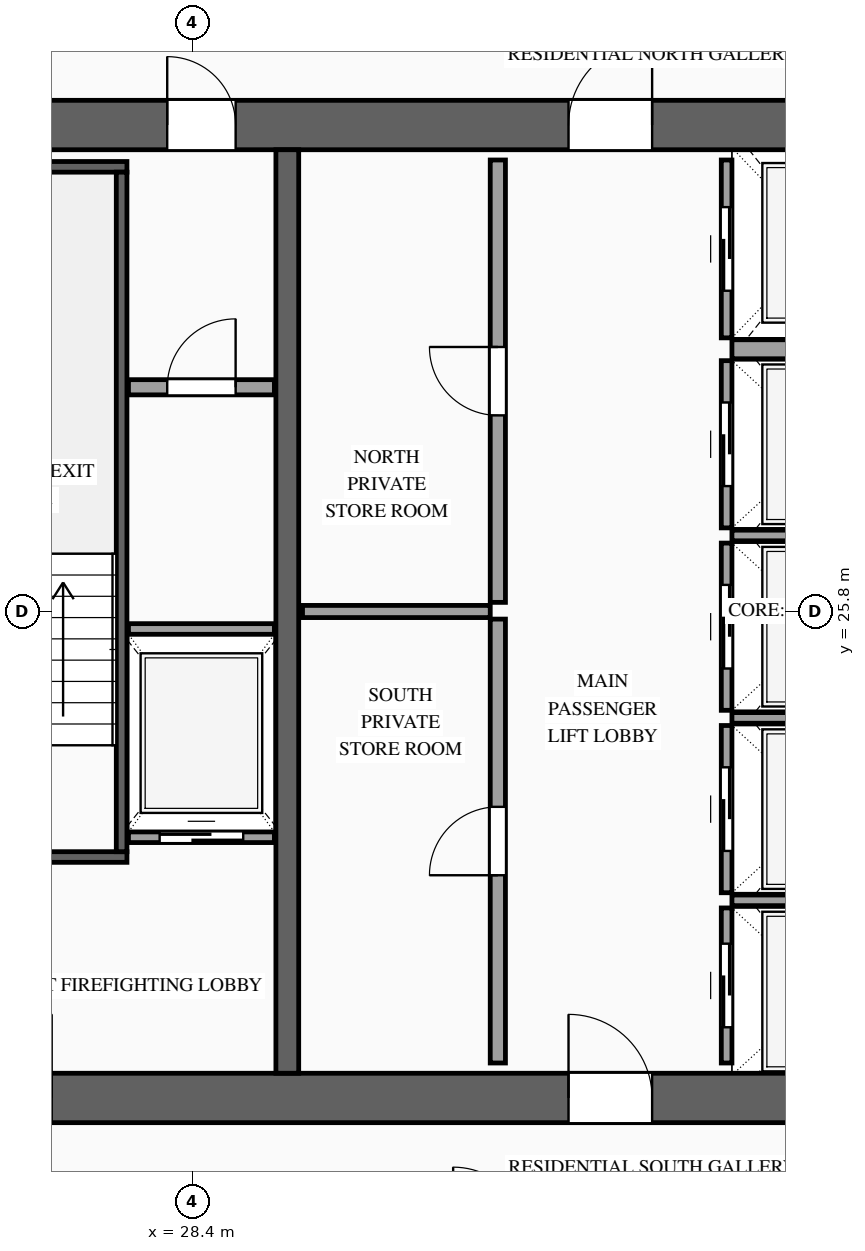
"""IFC4 building model, lengths in metres.
Left out: names, types, materials, properties, quantities, classifications, styles, units other than length and angle.
Written with IfcOpenShell. Run it as: python <this file> out.ifc"""

import sys

from ifc_helpers import new_model, si_unit, direction, frame, frame_2d, origin, place, context, subcontext, project, spatial, rectangle, extrude, source, transform, mapped, element, fill, save


model = new_model("IFC4")
c1 = context("Model", 3, precision=1e-05, world=origin(), true_north=direction((0.0, 1.0)))
c2 = subcontext(c1, "Body", "Model", "MODEL_VIEW")
j1 = project(units=[si_unit("LENGTHUNIT", "METRE"), si_unit("PLANEANGLEUNIT", "RADIAN")], contexts=[c1])
p1 = place(None, origin())
s1 = spatial("IfcSite", under=j1, at=p1, CompositionType="ELEMENT")
p2 = place(p1, origin())
s2 = spatial("IfcBuilding", under=s1, at=p2, CompositionType="ELEMENT")
p3 = place(p2, frame((0.0, 0.0, 188.0)))
s3 = spatial("IfcBuildingStorey", under=s2, at=p3, CompositionType="ELEMENT", Elevation=188.0)
p4 = place(p3, frame((23.475, 19.4, 0.0), z_axis=(0.0, 0.0, 1.0), x_axis=(1.0, 0.0, 0.0)))
e1 = element("IfcWall", 1, at=p4, inside=s3, PredefinedType="SHEAR", context=c2, shape_type="SweptSolid", body=[
    extrude(rectangle(XDim=27.05, YDim=0.65, at=frame_2d((13.525, 0.0))), origin(), (0.0, 0.0, 1.0), 3.5),
])
p5 = place(p4, frame((1.975, 0.0, 0.0)))
e2 = element("IfcOpeningElement", 2, at=p5, cuts=e1, PredefinedType="OPENING", context=c2, shape_type="SweptSolid", body=[
    extrude(rectangle(XDim=1.1, YDim=2.2, at=frame_2d((0.55, 1.1))), frame((0.0, 0.34, 0.0), z_axis=(0.0, -1.0, 0.0), x_axis=(1.0, 0.0, 0.0)), (0.0, 0.0, 1.0), 0.68),
])
p6 = place(p4, frame((9.875, 0.0, 0.0)))
e3 = element("IfcOpeningElement", 3, at=p6, cuts=e1, PredefinedType="OPENING", context=c2, shape_type="SweptSolid", body=[
    extrude(rectangle(XDim=1.1, YDim=2.2, at=frame_2d((0.55, 1.1))), frame((0.0, 0.34, 0.0), z_axis=(0.0, -1.0, 0.0), x_axis=(1.0, 0.0, 0.0)), (0.0, 0.0, 1.0), 0.68),
])
p7 = place(p4, frame((23.075, 0.0, 0.0)))
e4 = element("IfcOpeningElement", 4, at=p7, cuts=e1, PredefinedType="OPENING", context=c2, shape_type="SweptSolid", body=[
    extrude(rectangle(XDim=1.1, YDim=2.2, at=frame_2d((0.55, 1.1))), frame((0.0, 0.34, 0.0), z_axis=(0.0, -1.0, 0.0), x_axis=(1.0, 0.0, 0.0)), (0.0, 0.0, 1.0), 0.68),
])
p8 = place(p4, frame((19.695, 0.0, 0.0)))
e5 = element("IfcOpeningElement", 5, at=p8, cuts=e1, PredefinedType="OPENING", context=c2, shape_type="SweptSolid", body=[
    extrude(rectangle(XDim=0.9, YDim=2.15, at=frame_2d((0.45, 1.075))), frame((0.0, 0.34, 0.0), z_axis=(0.0, -1.0, 0.0), x_axis=(1.0, 0.0, 0.0)), (0.0, 0.0, 1.0), 0.68),
])
p9 = place(p4, frame((18.255, 0.0, 0.0)))
e6 = element("IfcOpeningElement", 6, at=p9, cuts=e1, PredefinedType="OPENING", context=c2, shape_type="SweptSolid", body=[
    extrude(rectangle(XDim=0.9, YDim=2.15, at=frame_2d((0.45, 1.075))), frame((0.0, 0.34, 0.0), z_axis=(0.0, -1.0, 0.0), x_axis=(1.0, 0.0, 0.0)), (0.0, 0.0, 1.0), 0.68),
])
p10 = place(p3, frame((23.475, 32.2, 0.0), z_axis=(0.0, 0.0, 1.0), x_axis=(1.0, 0.0, 0.0)))
e7 = element("IfcWall", 7, at=p10, inside=s3, PredefinedType="SHEAR", context=c2, shape_type="SweptSolid", body=[
    extrude(rectangle(XDim=27.05, YDim=0.65, at=frame_2d((13.525, 0.0))), origin(), (0.0, 0.0, 1.0), 3.5),
])
p11 = place(p10, frame((4.595, 0.0, 0.0)))
e8 = element("IfcOpeningElement", 8, at=p11, cuts=e7, PredefinedType="OPENING", context=c2, shape_type="SweptSolid", body=[
    extrude(rectangle(XDim=0.9, YDim=2.15, at=frame_2d((0.45, 1.075))), frame((0.0, 0.34, 0.0), z_axis=(0.0, -1.0, 0.0), x_axis=(1.0, 0.0, 0.0)), (0.0, 0.0, 1.0), 0.68),
])
p12 = place(p10, frame((9.875, 0.0, 0.0)))
e9 = element("IfcOpeningElement", 9, at=p12, cuts=e7, PredefinedType="OPENING", context=c2, shape_type="SweptSolid", body=[
    extrude(rectangle(XDim=1.1, YDim=2.2, at=frame_2d((0.55, 1.1))), frame((0.0, 0.34, 0.0), z_axis=(0.0, -1.0, 0.0), x_axis=(1.0, 0.0, 0.0)), (0.0, 0.0, 1.0), 0.68),
])
p13 = place(p10, frame((15.725, 0.0, 0.0)))
e10 = element("IfcOpeningElement", 10, at=p13, cuts=e7, PredefinedType="OPENING", context=c2, shape_type="SweptSolid", body=[
    extrude(rectangle(XDim=1.1, YDim=2.2, at=frame_2d((0.55, 1.1))), frame((0.0, 0.34, 0.0), z_axis=(0.0, -1.0, 0.0), x_axis=(1.0, 0.0, 0.0)), (0.0, 0.0, 1.0), 0.68),
])
p14 = place(p10, frame((19.695, 0.0, 0.0)))
e11 = element("IfcOpeningElement", 11, at=p14, cuts=e7, PredefinedType="OPENING", context=c2, shape_type="SweptSolid", body=[
    extrude(rectangle(XDim=0.9, YDim=2.15, at=frame_2d((0.45, 1.075))), frame((0.0, 0.34, 0.0), z_axis=(0.0, -1.0, 0.0), x_axis=(1.0, 0.0, 0.0)), (0.0, 0.0, 1.0), 0.68),
])
m1 = source(origin(), c2, "Body", "SweptSolid", [
    extrude(rectangle(XDim=12.15, YDim=0.3, at=frame_2d((6.075, 0.0))), origin(), (0.0, 0.0, 1.0), 3.5),
])
p15 = place(p3, frame((29.65, 19.725, 0.0), z_axis=(0.0, 0.0, 1.0), x_axis=(0.0, 1.0, 0.0)))
e12 = element("IfcWall", 12, at=p15, inside=s3, PredefinedType="SOLIDWALL", context=c2, shape_type="MappedRepresentation", body=[
    mapped(m1, transform((0.0, 0.0, 0.0), scale=1.0)),
])
p16 = place(p3, frame((27.56, 22.83, 0.0), z_axis=(0.0, 0.0, 1.0), x_axis=(1.0, 0.0, 0.0)))
e13 = element("IfcWall", 13, at=p16, inside=s3, PredefinedType="SOLIDWALL", context=c2, shape_type="SweptSolid", body=[
    extrude(rectangle(XDim=1.92, YDim=0.14, at=frame_2d((0.96, 0.0))), origin(), (0.0, 0.0, 1.0), 3.28),
])
p17 = place(p16, frame((0.41, 0.0, 0.0)))
e14 = element("IfcOpeningElement", 14, at=p17, cuts=e13, PredefinedType="OPENING", context=c2, shape_type="SweptSolid", body=[
    extrude(rectangle(XDim=1.1, YDim=2.2, at=frame_2d((0.55, 1.1))), frame((0.0, 0.085, 0.0), z_axis=(0.0, -1.0, 0.0), x_axis=(1.0, 0.0, 0.0)), (0.0, 0.0, 1.0), 0.17),
])
m2 = source(origin(), c2, "Body", "SweptSolid", [
    extrude(rectangle(XDim=1.92, YDim=0.14, at=frame_2d((0.96, 0.0))), origin(), (0.0, 0.0, 1.0), 3.28),
])
p18 = place(p3, frame((27.56, 25.57, 0.0), z_axis=(0.0, 0.0, 1.0), x_axis=(1.0, 0.0, 0.0)))
e15 = element("IfcWall", 15, at=p18, inside=s3, PredefinedType="SOLIDWALL", context=c2, shape_type="MappedRepresentation", body=[
    mapped(m2, transform((0.0, 0.0, 0.0), scale=1.0)),
])
p19 = place(p3, frame((35.43, 19.86, 0.0), z_axis=(0.0, 0.0, 1.0), x_axis=(0.0, 1.0, 0.0)))
e16 = element("IfcWall", 16, at=p19, inside=s3, PredefinedType="SOLIDWALL", context=c2, shape_type="SweptSolid", body=[
    extrude(rectangle(XDim=2.04, YDim=0.14, at=frame_2d((1.02, 0.0))), origin(), (0.0, 0.0, 1.0), 3.28),
])
p20 = place(p19, frame((0.47, 0.0, 0.0)))
e17 = element("IfcOpeningElement", 17, at=p20, cuts=e16, PredefinedType="OPENING", context=c2, shape_type="SweptSolid", body=[
    extrude(rectangle(XDim=1.1, YDim=2.2, at=frame_2d((0.55, 1.1))), frame((0.0, 0.085, 0.0), z_axis=(0.0, -1.0, 0.0), x_axis=(1.0, 0.0, 0.0)), (0.0, 0.0, 1.0), 0.17),
])
m3 = source(origin(), c2, "Body", "SweptSolid", [
    extrude(rectangle(XDim=2.4, YDim=0.14, at=frame_2d((1.2, 0.0))), origin(), (0.0, 0.0, 1.0), 3.28),
])
p21 = place(p3, frame((35.5, 22.0, 0.0), z_axis=(0.0, 0.0, 1.0), x_axis=(1.0, 0.0, 0.0)))
e18 = element("IfcWall", 18, at=p21, inside=s3, PredefinedType="SOLIDWALL", context=c2, shape_type="MappedRepresentation", body=[
    mapped(m3, transform((0.0, 0.0, 0.0), scale=1.0)),
])
p22 = place(p3, frame((35.43, 22.1, 0.0), z_axis=(0.0, 0.0, 1.0), x_axis=(0.0, 1.0, 0.0)))
e19 = element("IfcWall", 19, at=p22, inside=s3, PredefinedType="SOLIDWALL", context=c2, shape_type="SweptSolid", body=[
    extrude(rectangle(XDim=2.2, YDim=0.14, at=frame_2d((1.1, 0.0))), origin(), (0.0, 0.0, 1.0), 3.28),
])
p23 = place(p22, frame((0.55, 0.0, 0.0)))
e20 = element("IfcOpeningElement", 20, at=p23, cuts=e19, PredefinedType="OPENING", context=c2, shape_type="SweptSolid", body=[
    extrude(rectangle(XDim=1.1, YDim=2.2, at=frame_2d((0.55, 1.1))), frame((0.0, 0.085, 0.0), z_axis=(0.0, -1.0, 0.0), x_axis=(1.0, 0.0, 0.0)), (0.0, 0.0, 1.0), 0.17),
])
p24 = place(p3, frame((35.5, 24.4, 0.0), z_axis=(0.0, 0.0, 1.0), x_axis=(1.0, 0.0, 0.0)))
e21 = element("IfcWall", 21, at=p24, inside=s3, PredefinedType="SOLIDWALL", context=c2, shape_type="MappedRepresentation", body=[
    mapped(m3, transform((0.0, 0.0, 0.0), scale=1.0)),
])
p25 = place(p3, frame((35.43, 24.5, 0.0), z_axis=(0.0, 0.0, 1.0), x_axis=(0.0, 1.0, 0.0)))
e22 = element("IfcWall", 22, at=p25, inside=s3, PredefinedType="SOLIDWALL", context=c2, shape_type="SweptSolid", body=[
    extrude(rectangle(XDim=2.2, YDim=0.14, at=frame_2d((1.1, 0.0))), origin(), (0.0, 0.0, 1.0), 3.28),
])
p26 = place(p25, frame((0.55, 0.0, 0.0)))
e23 = element("IfcOpeningElement", 23, at=p26, cuts=e22, PredefinedType="OPENING", context=c2, shape_type="SweptSolid", body=[
    extrude(rectangle(XDim=1.1, YDim=2.2, at=frame_2d((0.55, 1.1))), frame((0.0, 0.085, 0.0), z_axis=(0.0, -1.0, 0.0), x_axis=(1.0, 0.0, 0.0)), (0.0, 0.0, 1.0), 0.17),
])
p27 = place(p3, frame((35.5, 26.8, 0.0), z_axis=(0.0, 0.0, 1.0), x_axis=(1.0, 0.0, 0.0)))
e24 = element("IfcWall", 24, at=p27, inside=s3, PredefinedType="SOLIDWALL", context=c2, shape_type="MappedRepresentation", body=[
    mapped(m3, transform((0.0, 0.0, 0.0), scale=1.0)),
])
p28 = place(p3, frame((35.43, 26.9, 0.0), z_axis=(0.0, 0.0, 1.0), x_axis=(0.0, 1.0, 0.0)))
e25 = element("IfcWall", 25, at=p28, inside=s3, PredefinedType="SOLIDWALL", context=c2, shape_type="SweptSolid", body=[
    extrude(rectangle(XDim=2.2, YDim=0.14, at=frame_2d((1.1, 0.0))), origin(), (0.0, 0.0, 1.0), 3.28),
])
p29 = place(p28, frame((0.55, 0.0, 0.0)))
e26 = element("IfcOpeningElement", 26, at=p29, cuts=e25, PredefinedType="OPENING", context=c2, shape_type="SweptSolid", body=[
    extrude(rectangle(XDim=1.1, YDim=2.2, at=frame_2d((0.55, 1.1))), frame((0.0, 0.085, 0.0), z_axis=(0.0, -1.0, 0.0), x_axis=(1.0, 0.0, 0.0)), (0.0, 0.0, 1.0), 0.17),
])
p30 = place(p3, frame((35.43, 29.4, 0.0), z_axis=(0.0, 0.0, 1.0), x_axis=(0.0, 1.0, 0.0)))
e27 = element("IfcWall", 27, at=p30, inside=s3, PredefinedType="SOLIDWALL", context=c2, shape_type="SweptSolid", body=[
    extrude(rectangle(XDim=2.34, YDim=0.14, at=frame_2d((1.17, 0.0))), origin(), (0.0, 0.0, 1.0), 3.28),
])
p31 = place(p30, frame((0.62, 0.0, 0.0)))
e28 = element("IfcOpeningElement", 28, at=p31, cuts=e27, PredefinedType="OPENING", context=c2, shape_type="SweptSolid", body=[
    extrude(rectangle(XDim=1.1, YDim=2.2, at=frame_2d((0.55, 1.1))), frame((0.0, 0.085, 0.0), z_axis=(0.0, -1.0, 0.0), x_axis=(1.0, 0.0, 0.0)), (0.0, 0.0, 1.0), 0.17),
])
m4 = source(origin(), c2, "Body", "SweptSolid", [
    extrude(rectangle(XDim=2.4, YDim=0.25, at=frame_2d((1.2, 0.0))), origin(), (0.0, 0.0, 1.0), 3.28),
])
p32 = place(p3, frame((35.5, 29.25, 0.0), z_axis=(0.0, 0.0, 1.0), x_axis=(1.0, 0.0, 0.0)))
e29 = element("IfcWall", 29, at=p32, inside=s3, PredefinedType="SOLIDWALL", context=c2, shape_type="MappedRepresentation", body=[
    mapped(m4, transform((0.0, 0.0, 0.0), scale=1.0)),
])
p33 = place(p3, frame((24.26, 22.57, 0.0), z_axis=(0.0, 0.0, 1.0), x_axis=(1.0, 0.0, 0.0)))
e30 = element("IfcWall", 30, at=p33, inside=s3, PredefinedType="SOLIDWALL", context=c2, shape_type="SweptSolid", body=[
    extrude(rectangle(XDim=3.28, YDim=0.14, at=frame_2d((1.64, 0.0))), origin(), (0.0, 0.0, 1.0), 3.28),
])
p34 = place(p33, frame((1.09, 0.0, 0.0)))
e31 = element("IfcOpeningElement", 31, at=p34, cuts=e30, PredefinedType="OPENING", context=c2, shape_type="SweptSolid", body=[
    extrude(rectangle(XDim=1.1, YDim=2.2, at=frame_2d((0.55, 1.1))), frame((0.0, 0.085, 0.0), z_axis=(0.0, -1.0, 0.0), x_axis=(1.0, 0.0, 0.0)), (0.0, 0.0, 1.0), 0.17),
])
m5 = source(origin(), c2, "Body", "SweptSolid", [
    extrude(rectangle(XDim=3.28, YDim=0.14, at=frame_2d((1.64, 0.0))), origin(), (0.0, 0.0, 1.0), 3.28),
])
p35 = place(p3, frame((24.26, 31.65, 0.0), z_axis=(0.0, 0.0, 1.0), x_axis=(1.0, 0.0, 0.0)))
e32 = element("IfcWall", 32, at=p35, inside=s3, PredefinedType="SOLIDWALL", context=c2, shape_type="MappedRepresentation", body=[
    mapped(m5, transform((0.0, 0.0, 0.0), scale=1.0)),
])
m6 = source(origin(), c2, "Body", "SweptSolid", [
    extrude(rectangle(XDim=8.94, YDim=0.14, at=frame_2d((4.47, 0.0))), origin(), (0.0, 0.0, 1.0), 3.28),
])
p36 = place(p3, frame((27.47, 22.64, 0.0), z_axis=(0.0, 0.0, 1.0), x_axis=(0.0, 1.0, 0.0)))
e33 = element("IfcWall", 33, at=p36, inside=s3, PredefinedType="SOLIDWALL", context=c2, shape_type="MappedRepresentation", body=[
    mapped(m6, transform((0.0, 0.0, 0.0), scale=1.0)),
])
p37 = place(p3, frame((27.56, 28.75, 0.0), z_axis=(0.0, 0.0, 1.0), x_axis=(1.0, 0.0, 0.0)))
e34 = element("IfcWall", 34, at=p37, inside=s3, PredefinedType="PARTITIONING", context=c2, shape_type="SweptSolid", body=[
    extrude(rectangle(XDim=1.92, YDim=0.2, at=frame_2d((0.96, 0.0))), origin(), (0.0, 0.0, 1.0), 3.28),
])
p38 = place(p37, frame((0.51, 0.0, 0.0)))
e35 = element("IfcOpeningElement", 35, at=p38, cuts=e34, PredefinedType="OPENING", context=c2, shape_type="SweptSolid", body=[
    extrude(rectangle(XDim=0.9, YDim=2.15, at=frame_2d((0.45, 1.075))), frame((0.0, 0.115, 0.0), z_axis=(0.0, -1.0, 0.0), x_axis=(1.0, 0.0, 0.0)), (0.0, 0.0, 1.0), 0.23),
])
p39 = place(p3, frame((32.42, 19.86, 0.0), z_axis=(0.0, 0.0, 1.0), x_axis=(0.0, 1.0, 0.0)))
e36 = element("IfcWall", 36, at=p39, inside=s3, PredefinedType="PARTITIONING", context=c2, shape_type="SweptSolid", body=[
    extrude(rectangle(XDim=5.84, YDim=0.2, at=frame_2d((2.92, 0.0))), origin(), (0.0, 0.0, 1.0), 3.28),
])
p40 = place(p39, frame((2.47, 0.0, 0.0)))
e37 = element("IfcOpeningElement", 37, at=p40, cuts=e36, PredefinedType="OPENING", context=c2, shape_type="SweptSolid", body=[
    extrude(rectangle(XDim=0.9, YDim=2.15, at=frame_2d((0.45, 1.075))), frame((0.0, 0.115, 0.0), z_axis=(0.0, -1.0, 0.0), x_axis=(1.0, 0.0, 0.0)), (0.0, 0.0, 1.0), 0.23),
])
p41 = place(p3, frame((32.42, 25.92, 0.0), z_axis=(0.0, 0.0, 1.0), x_axis=(0.0, 1.0, 0.0)))
e38 = element("IfcWall", 38, at=p41, inside=s3, PredefinedType="PARTITIONING", context=c2, shape_type="SweptSolid", body=[
    extrude(rectangle(XDim=5.82, YDim=0.2, at=frame_2d((2.91, 0.0))), origin(), (0.0, 0.0, 1.0), 3.28),
])
p42 = place(p41, frame((2.46, 0.0, 0.0)))
e39 = element("IfcOpeningElement", 39, at=p42, cuts=e38, PredefinedType="OPENING", context=c2, shape_type="SweptSolid", body=[
    extrude(rectangle(XDim=0.9, YDim=2.15, at=frame_2d((0.45, 1.075))), frame((0.0, 0.115, 0.0), z_axis=(0.0, -1.0, 0.0), x_axis=(1.0, 0.0, 0.0)), (0.0, 0.0, 1.0), 0.23),
])
m7 = source(origin(), c2, "Body", "SweptSolid", [
    extrude(rectangle(XDim=2.47, YDim=0.16, at=frame_2d((1.235, 0.0))), origin(), (0.0, 0.0, 1.0), 3.28),
])
p43 = place(p3, frame((29.85, 25.8, 0.0), z_axis=(0.0, 0.0, 1.0), x_axis=(1.0, 0.0, 0.0)))
e40 = element("IfcWall", 40, at=p43, inside=s3, PredefinedType="PARTITIONING", context=c2, shape_type="MappedRepresentation", body=[
    mapped(m7, transform((0.0, 0.0, 0.0), scale=1.0)),
])
m8 = source(origin(), c2, "Body", "SweptSolid", [
    extrude(rectangle(XDim=1.1, YDim=2.2, at=frame_2d((0.55, 1.1))), frame((0.0, 0.025, 0.0), z_axis=(0.0, -1.0, 0.0), x_axis=(1.0, 0.0, 0.0)), (0.0, 0.0, 1.0), 0.05),
])
p44 = place(p17, origin())
e41 = element("IfcDoor", 41, at=p44, inside=s3, OperationType="SLIDING_TO_LEFT", PredefinedType="DOOR", context=c2, shape_type="MappedRepresentation", body=[
    mapped(m8, transform((0.0, 0.0, 0.0), scale=1.0)),
])
fill(e14, e41)
p45 = place(p20, origin())
e42 = element("IfcDoor", 42, at=p45, inside=s3, OperationType="SLIDING_TO_RIGHT", PredefinedType="DOOR", context=c2, shape_type="MappedRepresentation", body=[
    mapped(m8, transform((0.0, 0.0, 0.0), scale=1.0)),
])
fill(e17, e42)
p46 = place(p23, origin())
e43 = element("IfcDoor", 43, at=p46, inside=s3, OperationType="SLIDING_TO_LEFT", PredefinedType="DOOR", context=c2, shape_type="MappedRepresentation", body=[
    mapped(m8, transform((0.0, 0.0, 0.0), scale=1.0)),
])
fill(e20, e43)
p47 = place(p26, origin())
e44 = element("IfcDoor", 44, at=p47, inside=s3, OperationType="SLIDING_TO_RIGHT", PredefinedType="DOOR", context=c2, shape_type="MappedRepresentation", body=[
    mapped(m8, transform((0.0, 0.0, 0.0), scale=1.0)),
])
fill(e23, e44)
p48 = place(p29, origin())
e45 = element("IfcDoor", 45, at=p48, inside=s3, OperationType="SLIDING_TO_LEFT", PredefinedType="DOOR", context=c2, shape_type="MappedRepresentation", body=[
    mapped(m8, transform((0.0, 0.0, 0.0), scale=1.0)),
])
fill(e26, e45)
p49 = place(p31, origin())
e46 = element("IfcDoor", 46, at=p49, inside=s3, OperationType="SLIDING_TO_RIGHT", PredefinedType="DOOR", context=c2, shape_type="MappedRepresentation", body=[
    mapped(m8, transform((0.0, 0.0, 0.0), scale=1.0)),
])
fill(e28, e46)
m9 = source(origin(), c2, "Body", "SweptSolid", [
    extrude(rectangle(XDim=1.1, YDim=2.2, at=frame_2d((0.55, 1.1))), frame((0.0, 0.025, 0.0), z_axis=(0.0, -1.0, 0.0), x_axis=(1.0, 0.0, 0.0)), (0.0, 0.0, 1.0), 0.05),
])
p50 = place(p6, origin())
e47 = element("IfcDoor", 47, at=p50, inside=s3, OperationType="SINGLE_SWING_LEFT", PredefinedType="DOOR", context=c2, shape_type="MappedRepresentation", body=[
    mapped(m9, transform((0.0, 0.0, 0.0), scale=1.0)),
])
fill(e3, e47)
m10 = source(origin(), c2, "Body", "SweptSolid", [
    extrude(rectangle(XDim=0.9, YDim=2.15, at=frame_2d((0.45, 1.075))), frame((0.0, 0.025, 0.0), z_axis=(0.0, -1.0, 0.0), x_axis=(1.0, 0.0, 0.0)), (0.0, 0.0, 1.0), 0.05),
])
p51 = place(p11, origin())
e48 = element("IfcDoor", 48, at=p51, inside=s3, OperationType="SINGLE_SWING_LEFT", PredefinedType="DOOR", context=c2, shape_type="MappedRepresentation", body=[
    mapped(m10, transform((0.0, 0.0, 0.0), scale=1.0)),
])
fill(e8, e48)
p52 = place(p12, origin())
e49 = element("IfcDoor", 49, at=p52, inside=s3, OperationType="SINGLE_SWING_RIGHT", PredefinedType="DOOR", context=c2, shape_type="MappedRepresentation", body=[
    mapped(m9, transform((0.0, 0.0, 0.0), scale=1.0)),
])
fill(e9, e49)
p53 = place(p38, origin())
e50 = element("IfcDoor", 50, at=p53, inside=s3, OperationType="SINGLE_SWING_RIGHT", PredefinedType="DOOR", context=c2, shape_type="MappedRepresentation", body=[
    mapped(m10, transform((0.0, 0.0, 0.0), scale=1.0)),
])
fill(e35, e50)
p54 = place(p40, origin())
e51 = element("IfcDoor", 51, at=p54, inside=s3, OperationType="SINGLE_SWING_LEFT", PredefinedType="DOOR", context=c2, shape_type="MappedRepresentation", body=[
    mapped(m10, transform((0.0, 0.0, 0.0), scale=1.0)),
])
fill(e37, e51)
p55 = place(p42, origin())
e52 = element("IfcDoor", 52, at=p55, inside=s3, OperationType="SINGLE_SWING_RIGHT", PredefinedType="DOOR", context=c2, shape_type="MappedRepresentation", body=[
    mapped(m10, transform((0.0, 0.0, 0.0), scale=1.0)),
])
fill(e39, e52)
save(model, sys.argv[1])
